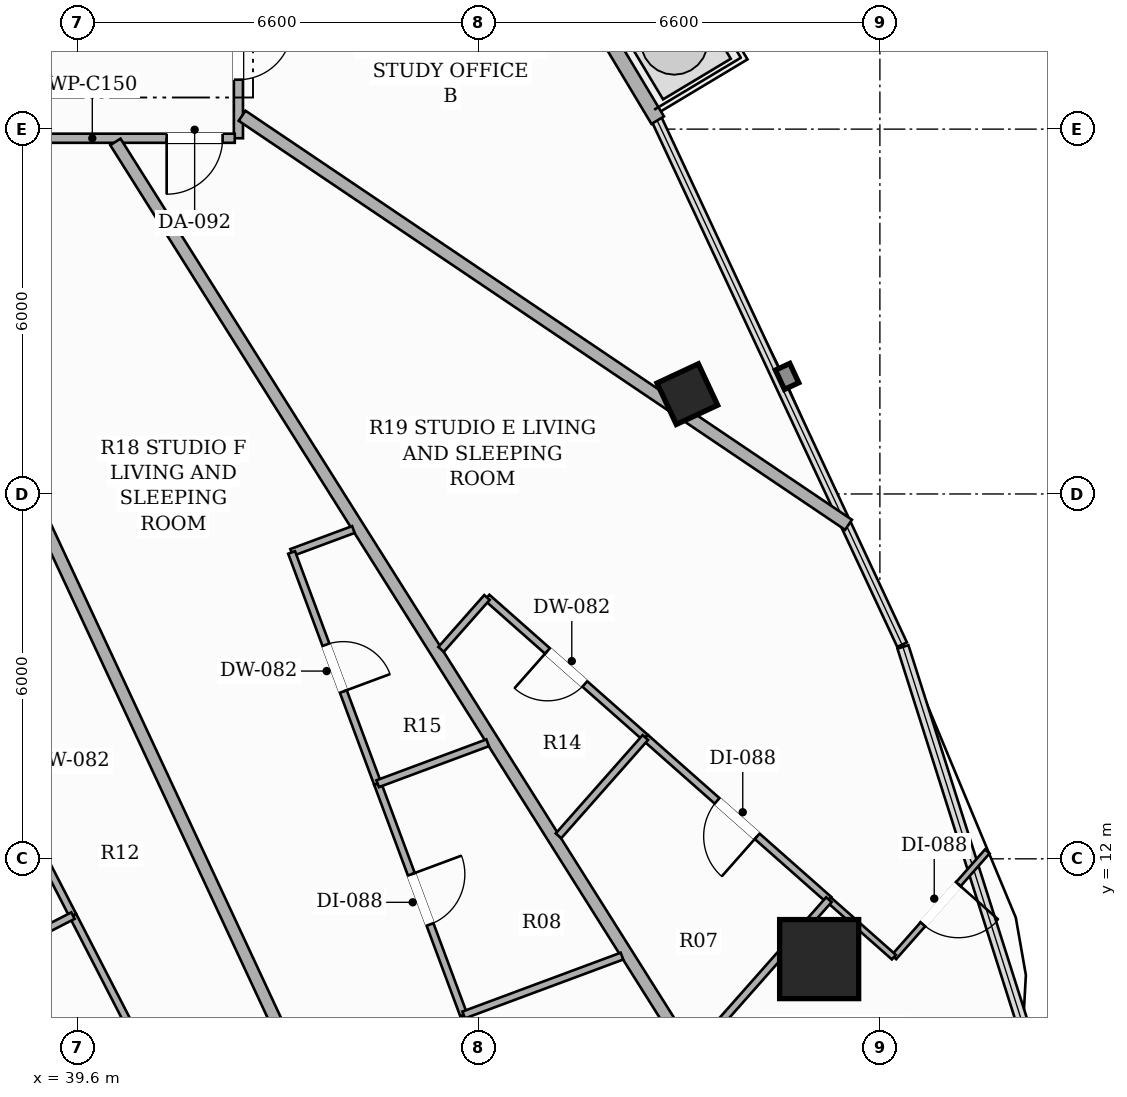
"""IFC4 building model, lengths in metres.
Left out: names, types, materials, properties, quantities, classifications, styles, units other than length and angle.
Written with IfcOpenShell. Run it as: python <this file> out.ifc"""

import sys

from ifc_helpers import new_model, si_unit, direction, frame, frame_2d, origin, origin_2d, place, context, subcontext, project, spatial, rectangle, hollow_rectangle, extrude, element, fill, save


model = new_model("IFC4")
c1 = context("Model", 3, precision=1e-05, world=origin(), true_north=direction((0.0, 1.0)))
c2 = subcontext(c1, "Body", "Model", "MODEL_VIEW")
j1 = project(units=[si_unit("LENGTHUNIT", "METRE"), si_unit("PLANEANGLEUNIT", "RADIAN")], contexts=[c1])
p1 = place(None, origin())
s1 = spatial("IfcSite", under=j1, at=p1, CompositionType="ELEMENT")
p2 = place(p1, origin())
s2 = spatial("IfcBuilding", under=s1, at=p2, CompositionType="ELEMENT")
p3 = place(p2, frame((0.0, 0.0, 253.55)))
s3 = spatial("IfcBuildingStorey", under=s2, at=p3, CompositionType="ELEMENT", Elevation=253.55)
p4 = place(p3, frame((51.801, 10.351, 0.0), z_axis=(0.0, 0.0, 1.0), x_axis=(1.0, 0.0, 0.0)))
e1 = element("IfcColumn", 1, at=p4, inside=s3, PredefinedType="COLUMN", context=c2, shape_type="SweptSolid", body=[
    extrude(hollow_rectangle(XDim=1.3, YDim=1.3, WallThickness=0.04, at=origin_2d()), origin(), (0.0, 0.0, 1.0), 3.3),
])
p5 = place(p3, frame((49.633, 19.642, 0.0), z_axis=(0.0, 0.0, 1.0), x_axis=(-0.422618261741, 0.906307787037, 0.0)))
e2 = element("IfcColumn", 2, at=p5, inside=s3, PredefinedType="COLUMN", context=c2, shape_type="SweptSolid", body=[
    extrude(hollow_rectangle(XDim=0.75, YDim=0.75, WallThickness=0.025, at=origin_2d()), origin(), (0.0, 0.0, 1.0), 3.3),
])
p6 = place(p3, frame((49.146, 24.147, 0.0), z_axis=(0.0, 0.0, 1.0), x_axis=(-0.514275407092, 0.857625096216, 0.0)))
e3 = element("IfcWall", 3, at=p6, inside=s3, PredefinedType="SOLIDWALL", context=c2, shape_type="SweptSolid", body=[
    extrude(rectangle(XDim=9.777, YDim=0.24, at=frame_2d((4.889, 0.0))), origin(), (0.0, 0.0, 1.0), 2.464),
])
p7 = place(p6, frame((7.279, 0.0, 0.0)))
e4 = element("IfcOpeningElement", 4, at=p7, cuts=e3, PredefinedType="OPENING", context=c2, shape_type="SweptSolid", body=[
    extrude(rectangle(XDim=1.8, YDim=2.2, at=frame_2d((0.9, 1.1))), frame((0.0, 0.13, 0.0), z_axis=(0.0, -1.0, 0.0), x_axis=(1.0, 0.0, 0.0)), (0.0, 0.0, 1.0), 0.26),
])
p8 = place(p3, frame((42.25, 26.59, 0.0), z_axis=(0.0, 0.0, 1.0), x_axis=(0.0, -1.0, 0.0)))
e5 = element("IfcWall", 5, at=p8, inside=s3, PredefinedType="PARTITIONING", context=c2, shape_type="SweptSolid", body=[
    extrude(rectangle(XDim=2.74, YDim=0.15, at=frame_2d((1.37, 0.0))), origin(), (0.0, 0.0, 1.0), 2.613),
])
p9 = place(p8, frame((0.897, 0.0, 0.0)))
e6 = element("IfcOpeningElement", 6, at=p9, cuts=e5, PredefinedType="OPENING", context=c2, shape_type="SweptSolid", body=[
    extrude(rectangle(XDim=0.88, YDim=2.1, at=frame_2d((0.44, 1.05))), frame((0.0, 0.085, 0.0), z_axis=(0.0, -1.0, 0.0), x_axis=(1.0, 0.0, 0.0)), (0.0, 0.0, 1.0), 0.17),
])
p10 = place(p3, frame((42.19, 23.85, 0.0), z_axis=(0.0, 0.0, 1.0), x_axis=(-1.0, 0.0, 0.0)))
e7 = element("IfcWall", 7, at=p10, inside=s3, PredefinedType="PARTITIONING", context=c2, shape_type="SweptSolid", body=[
    extrude(rectangle(XDim=8.355, YDim=0.15, at=frame_2d((4.177, 0.0))), origin(), (0.0, 0.0, 1.0), 2.405),
])
p11 = place(p10, frame((0.2, 0.0, 0.0)))
e8 = element("IfcOpeningElement", 8, at=p11, cuts=e7, PredefinedType="OPENING", context=c2, shape_type="SweptSolid", body=[
    extrude(rectangle(XDim=0.92, YDim=2.15, at=frame_2d((0.46, 1.075))), frame((0.0, 0.085, 0.0), z_axis=(0.0, -1.0, 0.0), x_axis=(1.0, 0.0, 0.0)), (0.0, 0.0, 1.0), 0.17),
])
p12 = place(p10, frame((3.566, 0.0, 0.0)))
e9 = element("IfcOpeningElement", 9, at=p12, cuts=e7, PredefinedType="OPENING", context=c2, shape_type="SweptSolid", body=[
    extrude(rectangle(XDim=0.92, YDim=2.15, at=frame_2d((0.46, 1.075))), frame((0.0, 0.085, 0.0), z_axis=(0.0, -1.0, 0.0), x_axis=(1.0, 0.0, 0.0)), (0.0, 0.0, 1.0), 0.17),
])
p13 = place(p10, frame((6.432, 0.0, 0.0)))
e10 = element("IfcOpeningElement", 10, at=p13, cuts=e7, PredefinedType="OPENING", context=c2, shape_type="SweptSolid", body=[
    extrude(rectangle(XDim=0.92, YDim=2.15, at=frame_2d((0.46, 1.075))), frame((0.0, 0.085, 0.0), z_axis=(0.0, -1.0, 0.0), x_axis=(1.0, 0.0, 0.0)), (0.0, 0.0, 1.0), 0.17),
])
p14 = place(p3, frame((52.284, 17.493, 0.0), z_axis=(0.0, 0.0, 1.0), x_axis=(-0.829053532208, 0.559169241584, 0.0)))
e11 = element("IfcWall", 11, at=p14, inside=s3, PredefinedType="PARTITIONING", context=c2, shape_type="SweptSolid", body=[
    extrude(rectangle(XDim=12.031, YDim=0.2, at=frame_2d((6.015, 0.0))), origin(), (0.0, 0.0, 1.0), 2.332),
])
p15 = place(p3, frame((50.863, 6.899, 0.0), z_axis=(0.0, 0.0, 1.0), x_axis=(-0.532843438342, 0.846213844259, 0.0)))
e12 = element("IfcWall", 12, at=p15, inside=s3, PredefinedType="PARTITIONING", context=c2, shape_type="SweptSolid", body=[
    extrude(rectangle(XDim=19.961, YDim=0.2, at=frame_2d((9.98, 0.0))), origin(), (0.0, 0.0, 1.0), 2.332),
])
p16 = place(p3, frame((44.391, 6.058, 0.0), z_axis=(0.0, 0.0, 1.0), x_axis=(-0.422434507673, 0.906393450289, 0.0)))
e13 = element("IfcWall", 13, at=p16, inside=s3, PredefinedType="PARTITIONING", context=c2, shape_type="SweptSolid", body=[
    extrude(rectangle(XDim=19.563, YDim=0.2, at=frame_2d((9.782, 0.0))), origin(), (0.0, 0.0, 1.0), 2.332),
])
p17 = place(p3, frame((48.943, 13.995, 0.0), z_axis=(0.0, 0.0, 1.0), x_axis=(-0.749231040751, 0.662308725275, 0.0)))
e14 = element("IfcWall", 14, at=p17, inside=s3, PredefinedType="PARTITIONING", context=c2, shape_type="SweptSolid", body=[
    extrude(rectangle(XDim=3.477, YDim=0.12, at=frame_2d((1.739, 0.0))), origin(), (0.0, 0.0, 1.0), 2.405),
])
p18 = place(p17, frame((1.329, 0.0, 0.0)))
e15 = element("IfcOpeningElement", 15, at=p18, cuts=e14, PredefinedType="OPENING", context=c2, shape_type="SweptSolid", body=[
    extrude(rectangle(XDim=0.82, YDim=2.1, at=frame_2d((0.41, 1.05))), frame((0.0, 0.07, 0.0), z_axis=(0.0, -1.0, 0.0), x_axis=(1.0, 0.0, 0.0)), (0.0, 0.0, 1.0), 0.14),
])
p19 = place(p3, frame((46.338, 16.298, 0.0), z_axis=(0.0, 0.0, 1.0), x_axis=(-0.662287293934, -0.749249985181, 0.0)))
e16 = element("IfcWall", 16, at=p19, inside=s3, PredefinedType="PARTITIONING", context=c2, shape_type="SweptSolid", body=[
    extrude(rectangle(XDim=1.14, YDim=0.12, at=frame_2d((0.57, 0.0))), origin(), (0.0, 0.0, 1.0), 2.9),
])
p20 = place(p3, frame((51.961, 11.328, 0.0), z_axis=(0.0, 0.0, 1.0), x_axis=(-0.749289212621, 0.662242913024, 0.0)))
e17 = element("IfcWall", 17, at=p20, inside=s3, PredefinedType="PARTITIONING", context=c2, shape_type="SweptSolid", body=[
    extrude(rectangle(XDim=4.028, YDim=0.12, at=frame_2d((2.014, 0.0))), origin(), (0.0, 0.0, 1.0), 2.332),
])
p21 = place(p20, frame((1.574, 0.0, 0.0)))
e18 = element("IfcOpeningElement", 18, at=p21, cuts=e17, PredefinedType="OPENING", context=c2, shape_type="SweptSolid", body=[
    extrude(rectangle(XDim=0.88, YDim=2.1, at=frame_2d((0.44, 1.05))), frame((0.0, 0.07, 0.0), z_axis=(0.0, -1.0, 0.0), x_axis=(1.0, 0.0, 0.0)), (0.0, 0.0, 1.0), 0.14),
])
p22 = place(p3, frame((54.567, 12.122, 0.0), z_axis=(0.0, 0.0, 1.0), x_axis=(-0.662212906575, -0.749315732095, 0.0)))
e19 = element("IfcWall", 19, at=p22, inside=s3, PredefinedType="PARTITIONING", context=c2, shape_type="SweptSolid", body=[
    extrude(rectangle(XDim=2.321, YDim=0.1, at=frame_2d((1.16, 0.0))), origin(), (0.0, 0.0, 1.0), 2.9),
])
p23 = place(p22, frame((0.72, 0.0, 0.0)))
e20 = element("IfcOpeningElement", 20, at=p23, cuts=e19, PredefinedType="OPENING", context=c2, shape_type="SweptSolid", body=[
    extrude(rectangle(XDim=0.88, YDim=2.1, at=frame_2d((0.44, 1.05))), frame((0.0, 0.06, 0.0), z_axis=(0.0, -1.0, 0.0), x_axis=(1.0, 0.0, 0.0)), (0.0, 0.0, 1.0), 0.12),
])
p24 = place(p3, frame((53.03, 10.383, 0.0), z_axis=(0.0, 0.0, 1.0), x_axis=(-0.749313288423, 0.66221567166, 0.0)))
e21 = element("IfcWall", 21, at=p24, inside=s3, PredefinedType="PARTITIONING", context=c2, shape_type="SweptSolid", body=[
    extrude(rectangle(XDim=1.427, YDim=0.1, at=frame_2d((0.713, 0.0))), origin(), (0.0, 0.0, 1.0), 2.332),
])
p25 = place(p3, frame((48.943, 13.995, 0.0), z_axis=(0.0, 0.0, 1.0), x_axis=(-0.662212567735, -0.749316031547, 0.0)))
e22 = element("IfcWall", 22, at=p25, inside=s3, PredefinedType="PARTITIONING", context=c2, shape_type="SweptSolid", body=[
    extrude(rectangle(XDim=2.158, YDim=0.12, at=frame_2d((1.079, 0.0))), origin(), (0.0, 0.0, 1.0), 2.405),
])
p26 = place(p3, frame((51.961, 11.328, 0.0), z_axis=(0.0, 0.0, 1.0), x_axis=(-0.662327669466, -0.74921429395, 0.0)))
e23 = element("IfcWall", 23, at=p26, inside=s3, PredefinedType="PARTITIONING", context=c2, shape_type="SweptSolid", body=[
    extrude(rectangle(XDim=3.338, YDim=0.12, at=frame_2d((1.669, 0.0))), origin(), (0.0, 0.0, 1.0), 2.332),
])
p27 = place(p3, frame((44.141, 17.415, 0.0), z_axis=(0.0, 0.0, 1.0), x_axis=(-0.937563848777, -0.347813210599, 0.0)))
e24 = element("IfcWall", 24, at=p27, inside=s3, PredefinedType="PARTITIONING", context=c2, shape_type="SweptSolid", body=[
    extrude(rectangle(XDim=1.084, YDim=0.12, at=frame_2d((0.542, 0.0))), origin(), (0.0, 0.0, 1.0), 2.613),
])
p28 = place(p3, frame((43.125, 17.038, 0.0), z_axis=(0.0, 0.0, 1.0), x_axis=(0.348728795746, -0.937223680355, 0.0)))
e25 = element("IfcWall", 25, at=p28, inside=s3, PredefinedType="PARTITIONING", context=c2, shape_type="SweptSolid", body=[
    extrude(rectangle(XDim=4.058, YDim=0.12, at=frame_2d((2.029, 0.0))), origin(), (0.0, 0.0, 1.0), 2.613),
])
p29 = place(p28, frame((1.619, 0.0, 0.0)))
e26 = element("IfcOpeningElement", 26, at=p29, cuts=e25, PredefinedType="OPENING", context=c2, shape_type="SweptSolid", body=[
    extrude(rectangle(XDim=0.82, YDim=2.1, at=frame_2d((0.41, 1.05))), frame((0.0, 0.07, 0.0), z_axis=(0.0, -1.0, 0.0), x_axis=(1.0, 0.0, 0.0)), (0.0, 0.0, 1.0), 0.14),
])
p30 = place(p3, frame((44.54, 13.235, 0.0), z_axis=(0.0, 0.0, 1.0), x_axis=(0.348709131935, -0.937230996769, 0.0)))
e27 = element("IfcWall", 27, at=p30, inside=s3, PredefinedType="PARTITIONING", context=c2, shape_type="SweptSolid", body=[
    extrude(rectangle(XDim=4.058, YDim=0.12, at=frame_2d((2.029, 0.0))), origin(), (0.0, 0.0, 1.0), 2.9),
])
p31 = place(p30, frame((1.589, 0.0, 0.0)))
e28 = element("IfcOpeningElement", 28, at=p31, cuts=e27, PredefinedType="OPENING", context=c2, shape_type="SweptSolid", body=[
    extrude(rectangle(XDim=0.88, YDim=2.1, at=frame_2d((0.44, 1.05))), frame((0.0, 0.07, 0.0), z_axis=(0.0, -1.0, 0.0), x_axis=(1.0, 0.0, 0.0)), (0.0, 0.0, 1.0), 0.14),
])
p32 = place(p3, frame((45.955, 9.432, 0.0), z_axis=(0.0, 0.0, 1.0), x_axis=(0.34888547359, -0.937165367647, 0.0)))
e29 = element("IfcWall", 29, at=p32, inside=s3, PredefinedType="PARTITIONING", context=c2, shape_type="SweptSolid", body=[
    extrude(rectangle(XDim=3.253, YDim=0.1, at=frame_2d((1.626, 0.0))), origin(), (0.0, 0.0, 1.0), 2.332),
])
p33 = place(p32, frame((1.187, 0.0, 0.0)))
e30 = element("IfcOpeningElement", 30, at=p33, cuts=e29, PredefinedType="OPENING", context=c2, shape_type="SweptSolid", body=[
    extrude(rectangle(XDim=0.88, YDim=2.1, at=frame_2d((0.44, 1.05))), frame((0.0, 0.06, 0.0), z_axis=(0.0, -1.0, 0.0), x_axis=(1.0, 0.0, 0.0)), (0.0, 0.0, 1.0), 0.12),
])
p34 = place(p3, frame((46.349, 13.908, 0.0), z_axis=(0.0, 0.0, 1.0), x_axis=(-0.937271835507, -0.348599349347, 0.0)))
e31 = element("IfcWall", 31, at=p34, inside=s3, PredefinedType="PARTITIONING", context=c2, shape_type="SweptSolid", body=[
    extrude(rectangle(XDim=1.93, YDim=0.12, at=frame_2d((0.965, 0.0))), origin(), (0.0, 0.0, 1.0), 2.613),
])
p35 = place(p3, frame((48.558, 10.4, 0.0), z_axis=(0.0, 0.0, 1.0), x_axis=(-0.937286649549, -0.34855951655, 0.0)))
e32 = element("IfcWall", 32, at=p35, inside=s3, PredefinedType="PARTITIONING", context=c2, shape_type="SweptSolid", body=[
    extrude(rectangle(XDim=2.777, YDim=0.12, at=frame_2d((1.389, 0.0))), origin(), (0.0, 0.0, 1.0), 2.613),
])
p36 = place(p3, frame((39.529, 11.066, 0.0), z_axis=(0.0, 0.0, 1.0), x_axis=(-0.457798211716, 0.889056127221, 0.0)))
e33 = element("IfcWall", 33, at=p36, inside=s3, PredefinedType="PARTITIONING", context=c2, shape_type="SweptSolid", body=[
    extrude(rectangle(XDim=5.574, YDim=0.12, at=frame_2d((2.787, 0.0))), origin(), (0.0, 0.0, 1.0), 2.613),
])
p37 = place(p36, frame((2.377, 0.0, 0.0)))
e34 = element("IfcOpeningElement", 34, at=p37, cuts=e33, PredefinedType="OPENING", context=c2, shape_type="SweptSolid", body=[
    extrude(rectangle(XDim=0.82, YDim=2.1, at=frame_2d((0.41, 1.05))), frame((0.0, 0.07, 0.0), z_axis=(0.0, -1.0, 0.0), x_axis=(1.0, 0.0, 0.0)), (0.0, 0.0, 1.0), 0.14),
])
p38 = place(p3, frame((42.228, 5.826, 0.0), z_axis=(0.0, 0.0, 1.0), x_axis=(-0.457901041138, 0.889003170143, 0.0)))
e35 = element("IfcWall", 35, at=p38, inside=s3, PredefinedType="PARTITIONING", context=c2, shape_type="SweptSolid", body=[
    extrude(rectangle(XDim=5.894, YDim=0.12, at=frame_2d((2.947, 0.0))), origin(), (0.0, 0.0, 1.0), 2.332),
])
p39 = place(p38, frame((2.507, 0.0, 0.0)))
e36 = element("IfcOpeningElement", 36, at=p39, cuts=e35, PredefinedType="OPENING", context=c2, shape_type="SweptSolid", body=[
    extrude(rectangle(XDim=0.88, YDim=2.1, at=frame_2d((0.44, 1.05))), frame((0.0, 0.07, 0.0), z_axis=(0.0, -1.0, 0.0), x_axis=(1.0, 0.0, 0.0)), (0.0, 0.0, 1.0), 0.14),
])
p40 = place(p3, frame((39.529, 11.066, 0.0), z_axis=(0.0, 0.0, 1.0), x_axis=(-0.889105964634, -0.457701413207, 0.0)))
e37 = element("IfcWall", 37, at=p40, inside=s3, PredefinedType="PARTITIONING", context=c2, shape_type="SweptSolid", body=[
    extrude(rectangle(XDim=2.154, YDim=0.12, at=frame_2d((1.077, 0.0))), origin(), (0.0, 0.0, 1.0), 2.613),
])
p41 = place(p9, origin())
e38 = element("IfcDoor", 38, at=p41, inside=s3, OperationType="SINGLE_SWING_LEFT", PredefinedType="DOOR", context=c2, shape_type="SweptSolid", body=[
    extrude(rectangle(XDim=0.88, YDim=2.1, at=frame_2d((0.44, 1.05))), frame((0.0, 0.025, 0.0), z_axis=(0.0, -1.0, 0.0), x_axis=(1.0, 0.0, 0.0)), (0.0, 0.0, 1.0), 0.05),
])
fill(e6, e38)
p42 = place(p11, origin())
e39 = element("IfcDoor", 39, at=p42, inside=s3, OperationType="SINGLE_SWING_RIGHT", PredefinedType="DOOR", context=c2, shape_type="SweptSolid", body=[
    extrude(rectangle(XDim=0.92, YDim=2.15, at=frame_2d((0.46, 1.075))), frame((0.0, 0.025, 0.0), z_axis=(0.0, -1.0, 0.0), x_axis=(1.0, 0.0, 0.0)), (0.0, 0.0, 1.0), 0.05),
])
fill(e8, e39)
p43 = place(p18, origin())
e40 = element("IfcDoor", 40, at=p43, inside=s3, OperationType="SINGLE_SWING_RIGHT", PredefinedType="DOOR", context=c2, shape_type="SweptSolid", body=[
    extrude(rectangle(XDim=0.82, YDim=2.1, at=frame_2d((0.41, 1.05))), frame((0.0, 0.025, 0.0), z_axis=(0.0, -1.0, 0.0), x_axis=(1.0, 0.0, 0.0)), (0.0, 0.0, 1.0), 0.05),
])
fill(e15, e40)
p44 = place(p21, origin())
e41 = element("IfcDoor", 41, at=p44, inside=s3, OperationType="SINGLE_SWING_LEFT", PredefinedType="DOOR", context=c2, shape_type="SweptSolid", body=[
    extrude(rectangle(XDim=0.88, YDim=2.1, at=frame_2d((0.44, 1.05))), frame((0.0, 0.025, 0.0), z_axis=(0.0, -1.0, 0.0), x_axis=(1.0, 0.0, 0.0)), (0.0, 0.0, 1.0), 0.05),
])
fill(e18, e41)
p45 = place(p23, origin())
e42 = element("IfcDoor", 42, at=p45, inside=s3, OperationType="SINGLE_SWING_LEFT", PredefinedType="DOOR", context=c2, shape_type="SweptSolid", body=[
    extrude(rectangle(XDim=0.88, YDim=2.1, at=frame_2d((0.44, 1.05))), frame((0.0, 0.025, 0.0), z_axis=(0.0, -1.0, 0.0), x_axis=(1.0, 0.0, 0.0)), (0.0, 0.0, 1.0), 0.05),
])
fill(e20, e42)
p46 = place(p29, origin())
e43 = element("IfcDoor", 43, at=p46, inside=s3, OperationType="SINGLE_SWING_RIGHT", PredefinedType="DOOR", context=c2, shape_type="SweptSolid", body=[
    extrude(rectangle(XDim=0.82, YDim=2.1, at=frame_2d((0.41, 1.05))), frame((0.0, 0.025, 0.0), z_axis=(0.0, -1.0, 0.0), x_axis=(1.0, 0.0, 0.0)), (0.0, 0.0, 1.0), 0.05),
])
fill(e26, e43)
p47 = place(p31, origin())
e44 = element("IfcDoor", 44, at=p47, inside=s3, OperationType="SINGLE_SWING_LEFT", PredefinedType="DOOR", context=c2, shape_type="SweptSolid", body=[
    extrude(rectangle(XDim=0.88, YDim=2.1, at=frame_2d((0.44, 1.05))), frame((0.0, 0.025, 0.0), z_axis=(0.0, -1.0, 0.0), x_axis=(1.0, 0.0, 0.0)), (0.0, 0.0, 1.0), 0.05),
])
fill(e28, e44)
save(model, sys.argv[1])
